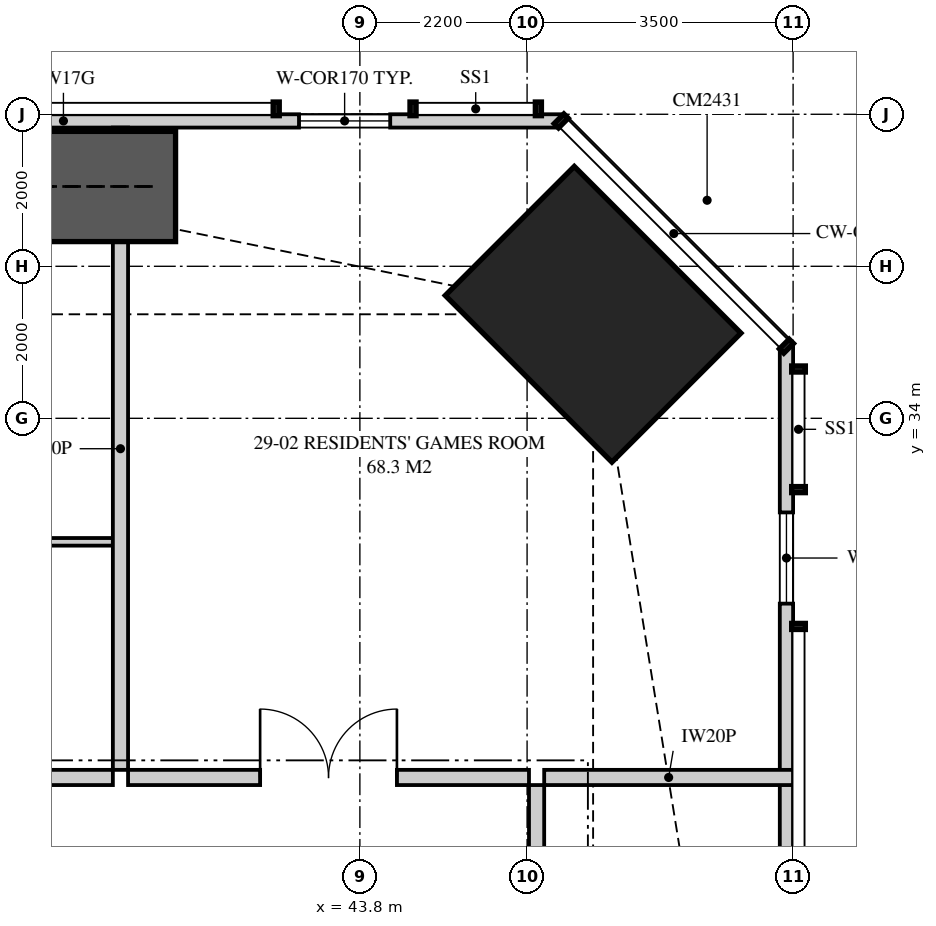
"""IFC4 building model, lengths in metres.
Left out: names, types, materials, properties, quantities, classifications, styles, units other than length and angle.
Written with IfcOpenShell. Run it as: python <this file> out.ifc"""

import sys

from ifc_helpers import new_model, si_unit, direction, frame, frame_2d, origin, origin_2d, place, context, subcontext, project, spatial, polyline, rectangle, outline, extrude, element, fill, save


model = new_model("IFC4")
c1 = context("Model", 3, precision=1e-05, world=origin(), true_north=direction((0.0, 1.0)))
c2 = subcontext(c1, "Body", "Model", "MODEL_VIEW")
j1 = project(units=[si_unit("LENGTHUNIT", "METRE"), si_unit("PLANEANGLEUNIT", "RADIAN")], contexts=[c1])
p1 = place(None, origin())
s1 = spatial("IfcSite", under=j1, at=p1, CompositionType="ELEMENT")
p2 = place(p1, origin())
s2 = spatial("IfcBuilding", under=s1, at=p2, CompositionType="ELEMENT")
p3 = place(p2, frame((0.0, 0.0, 108.2)))
s3 = spatial("IfcBuildingStorey", under=s2, at=p3, CompositionType="ELEMENT", Elevation=108.2)
p4 = place(p3, frame((46.869, 35.369, 0.0), z_axis=(0.0, 0.0, 1.0), x_axis=(-0.707106781187, -0.707106781187, 0.0)))
e1 = element("IfcColumn", 1, at=p4, inside=s3, PredefinedType="COLUMN", context=c2, shape_type="SweptSolid", body=[
    extrude(rectangle(XDim=2.4, YDim=3.1, at=origin_2d()), origin(), (0.0, 0.0, 1.0), 3.35),
])
p5 = place(p3, frame((49.413, 3.051, 0.0), z_axis=(0.0, 0.0, 1.0), x_axis=(0.0, 1.0, 0.0)))
e2 = element("IfcWall", 2, at=p5, inside=s3, PredefinedType="SOLIDWALL", context=c2, shape_type="SweptSolid", body=[
    extrude(outline(polyline([(0.0, 0.0), (31.897, 0.0), (31.897, 3.11), (22.167, 3.11), (22.167, 2.15), (22.074, 2.15), (22.074, 3.11), (21.949, 3.11), (21.949, 2.15), (9.949, 2.15), (9.949, 3.11), (9.823, 3.11), (9.823, 2.15), (9.73, 2.15), (9.73, 3.11), (0.0, 3.11), (0.0, 0.0)])), frame((0.0, 0.087, 0.0), z_axis=(0.0, -1.0, 0.0), x_axis=(1.0, 0.0, 0.0)), (0.0, 0.0, 1.0), 0.175),
])
p6 = place(p5, frame((2.224, 0.0, 0.4)))
e3 = element("IfcOpeningElement", 3, at=p6, cuts=e2, PredefinedType="OPENING", context=c2, shape_type="SweptSolid", body=[
    extrude(rectangle(XDim=1.8, YDim=1.7, at=frame_2d((0.9, 0.85))), frame((0.0, 0.097, 0.0), z_axis=(0.0, -1.0, 0.0), x_axis=(1.0, 0.0, 0.0)), (0.0, 0.0, 1.0), 0.195),
])
p7 = place(p5, frame((14.849, 0.0, 0.4)))
e4 = element("IfcOpeningElement", 4, at=p7, cuts=e2, PredefinedType="OPENING", context=c2, shape_type="SweptSolid", body=[
    extrude(rectangle(XDim=1.2, YDim=1.7, at=frame_2d((0.6, 0.85))), frame((0.0, 0.097, 0.0), z_axis=(0.0, -1.0, 0.0), x_axis=(1.0, 0.0, 0.0)), (0.0, 0.0, 1.0), 0.195),
])
p8 = place(p5, frame((28.51, 0.0, 0.4)))
e5 = element("IfcOpeningElement", 5, at=p8, cuts=e2, PredefinedType="OPENING", context=c2, shape_type="SweptSolid", body=[
    extrude(rectangle(XDim=1.2, YDim=1.7, at=frame_2d((0.6, 0.85))), frame((0.0, 0.097, 0.0), z_axis=(0.0, -1.0, 0.0), x_axis=(1.0, 0.0, 0.0)), (0.0, 0.0, 1.0), 0.195),
])
p9 = place(p3, frame((46.449, 37.913, 0.0), z_axis=(0.0, 0.0, 1.0), x_axis=(-1.0, 0.0, 0.0)))
e6 = element("IfcWall", 6, at=p9, inside=s3, PredefinedType="SOLIDWALL", context=c2, shape_type="SweptSolid", body=[
    extrude(outline(polyline([(0.0, 0.0), (13.098, 0.0), (13.098, 2.15), (7.824, 2.15), (7.824, 3.11), (7.666, 3.11), (7.666, 2.15), (7.62, 2.15), (7.62, 3.11), (0.0, 3.11), (0.0, 0.0)])), frame((0.0, 0.087, 0.0), z_axis=(0.0, -1.0, 0.0), x_axis=(1.0, 0.0, 0.0)), (0.0, 0.0, 1.0), 0.175),
])
p10 = place(p9, frame((2.25, 0.0, 0.4)))
e7 = element("IfcOpeningElement", 7, at=p10, cuts=e6, PredefinedType="OPENING", context=c2, shape_type="SweptSolid", body=[
    extrude(rectangle(XDim=1.2, YDim=1.7, at=frame_2d((0.6, 0.85))), frame((0.0, 0.097, 0.0), z_axis=(0.0, -1.0, 0.0), x_axis=(1.0, 0.0, 0.0)), (0.0, 0.0, 1.0), 0.195),
])
p11 = place(p9, frame((10.798, 0.0, 0.4)))
e8 = element("IfcOpeningElement", 8, at=p11, cuts=e6, PredefinedType="OPENING", context=c2, shape_type="SweptSolid", body=[
    extrude(rectangle(XDim=1.2, YDim=1.7, at=frame_2d((0.6, 0.85))), frame((0.0, 0.097, 0.0), z_axis=(0.0, -1.0, 0.0), x_axis=(1.0, 0.0, 0.0)), (0.0, 0.0, 1.0), 0.195),
])
p12 = place(p3, frame((40.65, 37.825, 0.0), z_axis=(0.0, 0.0, 1.0), x_axis=(0.0, -1.0, 0.0)))
e9 = element("IfcWall", 9, at=p12, inside=s3, PredefinedType="PARTITIONING", context=c2, shape_type="SweptSolid", body=[
    extrude(outline(polyline([(0.259, 3.11), (0.0, 3.11), (0.0, 0.0), (0.529, 0.0), (0.529, 0.12), (1.021, 0.12), (1.021, 0.0), (8.45, 0.0), (8.45, 3.11), (3.766, 3.11), (3.766, 2.51), (2.117, 2.51), (2.117, 2.15), (1.021, 2.15), (1.021, 2.03), (0.529, 2.03), (0.529, 2.15), (0.259, 2.15), (0.259, 3.11)])), frame((0.0, 0.1, 0.0), z_axis=(0.0, -1.0, 0.0), x_axis=(1.0, 0.0, 0.0)), (0.0, 0.0, 1.0), 0.2),
])
p13 = place(p3, frame((37.0, 32.375, 0.0), z_axis=(0.0, 0.0, 1.0), x_axis=(1.0, 0.0, 0.0)))
e10 = element("IfcWall", 10, at=p13, inside=s3, PredefinedType="PARTITIONING", context=c2, shape_type="SweptSolid", body=[
    extrude(outline(polyline([(0.0, 0.0), (3.55, 0.0), (3.55, 3.11), (1.912, 3.11), (1.912, 2.541), (1.338, 2.541), (1.338, 3.11), (0.0, 3.11), (0.0, 0.0)])), frame((0.0, 0.05, 0.0), z_axis=(0.0, -1.0, 0.0), x_axis=(1.0, 0.0, 0.0)), (0.0, 0.0, 1.0), 0.1),
])
p14 = place(p13, frame((1.3, 0.0, 0.0)))
e11 = element("IfcOpeningElement", 11, at=p14, cuts=e10, PredefinedType="OPENING", context=c2, shape_type="SweptSolid", body=[
    extrude(rectangle(XDim=0.9, YDim=2.1, at=frame_2d((0.45, 1.05))), frame((0.0, 0.06, 0.0), z_axis=(0.0, -1.0, 0.0), x_axis=(1.0, 0.0, 0.0)), (0.0, 0.0, 1.0), 0.12),
])
p15 = place(p3, frame((40.75, 29.275, 0.0), z_axis=(0.0, 0.0, 1.0), x_axis=(1.0, 0.0, 0.0)))
e12 = element("IfcWall", 12, at=p15, inside=s3, PredefinedType="PARTITIONING", context=c2, shape_type="SweptSolid", body=[
    extrude(rectangle(XDim=5.275, YDim=0.2, at=frame_2d((2.637, 0.0))), origin(), (0.0, 0.0, 1.0), 3.11),
])
p16 = place(p15, frame((1.738, 0.0, 0.0)))
e13 = element("IfcOpeningElement", 13, at=p16, cuts=e12, PredefinedType="OPENING", context=c2, shape_type="SweptSolid", body=[
    extrude(rectangle(XDim=1.8, YDim=2.1, at=frame_2d((0.9, 1.05))), frame((0.0, 0.11, 0.0), z_axis=(0.0, -1.0, 0.0), x_axis=(1.0, 0.0, 0.0)), (0.0, 0.0, 1.0), 0.22),
])
p17 = place(p3, frame((46.225, 29.275, 0.0), z_axis=(0.0, 0.0, 1.0), x_axis=(1.0, 0.0, 0.0)))
e14 = element("IfcWall", 14, at=p17, inside=s3, PredefinedType="PARTITIONING", context=c2, shape_type="SweptSolid", body=[
    extrude(outline(polyline([(0.0, 0.0), (3.275, 0.0), (3.275, 3.11), (2.554, 3.11), (2.554, 2.15), (0.805, 2.15), (0.805, 2.541), (0.306, 2.541), (0.306, 3.11), (0.0, 3.11), (0.0, 0.0)])), frame((0.0, 0.1, 0.0), z_axis=(0.0, -1.0, 0.0), x_axis=(1.0, 0.0, 0.0)), (0.0, 0.0, 1.0), 0.2),
])
p18 = place(p3, frame((46.125, 7.825, 0.0), z_axis=(0.0, 0.0, 1.0), x_axis=(0.0, 1.0, 0.0)))
e15 = element("IfcWall", 15, at=p18, inside=s3, PredefinedType="PARTITIONING", context=c2, shape_type="SweptSolid", body=[
    extrude(outline(polyline([(0.0, 0.0), (21.35, 0.0), (21.35, 3.11), (17.512, 3.11), (17.512, 2.541), (16.838, 2.541), (16.838, 3.11), (5.512, 3.11), (5.512, 2.541), (4.838, 2.541), (4.838, 3.11), (0.0, 3.11), (0.0, 0.0)])), frame((0.0, 0.1, 0.0), z_axis=(0.0, -1.0, 0.0), x_axis=(1.0, 0.0, 0.0)), (0.0, 0.0, 1.0), 0.2),
])
p19 = place(p18, frame((9.775, 0.0, 0.0)))
e16 = element("IfcOpeningElement", 16, at=p19, cuts=e15, PredefinedType="OPENING", context=c2, shape_type="SweptSolid", body=[
    extrude(rectangle(XDim=1.8, YDim=2.1, at=frame_2d((0.9, 1.05))), frame((0.0, 0.11, 0.0), z_axis=(0.0, -1.0, 0.0), x_axis=(1.0, 0.0, 0.0)), (0.0, 0.0, 1.0), 0.22),
])
p20 = place(p18, frame((19.5, 0.0, 0.0)))
e17 = element("IfcOpeningElement", 17, at=p20, cuts=e15, PredefinedType="OPENING", context=c2, shape_type="SweptSolid", body=[
    extrude(rectangle(XDim=1.0, YDim=2.1, at=frame_2d((0.5, 1.05))), frame((0.0, 0.11, 0.0), z_axis=(0.0, -1.0, 0.0), x_axis=(1.0, 0.0, 0.0)), (0.0, 0.0, 1.0), 0.22),
])
p21 = place(p3, frame((31.363, 29.275, 0.0), z_axis=(0.0, 0.0, 1.0), x_axis=(1.0, 0.0, 0.0)))
e18 = element("IfcWall", 18, at=p21, inside=s3, PredefinedType="PARTITIONING", context=c2, shape_type="SweptSolid", body=[
    extrude(outline(polyline([(0.0, 0.0), (9.188, 0.0), (9.188, 3.11), (7.6, 3.11), (7.6, 2.541), (6.925, 2.541), (6.925, 3.11), (0.0, 3.11), (0.0, 0.0)])), frame((0.0, 0.1, 0.0), z_axis=(0.0, -1.0, 0.0), x_axis=(1.0, 0.0, 0.0)), (0.0, 0.0, 1.0), 0.2),
])
p22 = place(p3, frame((35.875, 37.05, 0.0), z_axis=(0.0, 0.0, 1.0), x_axis=(1.0, 0.0, 0.0)))
e19 = element("IfcWall", 19, at=p22, inside=s3, PredefinedType="SHEAR", context=c2, shape_type="SweptSolid", body=[
    extrude(rectangle(XDim=5.5, YDim=1.45, at=frame_2d((2.75, 0.0))), origin(), (0.0, 0.0, 1.0), 3.35),
])
p23 = place(p8, origin())
e20 = element("IfcWindow", 20, at=p23, inside=s3, PartitioningType="SINGLE_PANEL", PredefinedType="WINDOW", context=c2, shape_type="SweptSolid", body=[
    extrude(rectangle(XDim=1.2, YDim=1.7, at=frame_2d((0.6, 0.85))), frame((0.0, 0.03, 0.0), z_axis=(0.0, -1.0, 0.0), x_axis=(1.0, 0.0, 0.0)), (0.0, 0.0, 1.0), 0.06),
])
fill(e5, e20)
p24 = place(p10, origin())
e21 = element("IfcWindow", 21, at=p24, inside=s3, PartitioningType="SINGLE_PANEL", PredefinedType="WINDOW", context=c2, shape_type="SweptSolid", body=[
    extrude(rectangle(XDim=1.2, YDim=1.7, at=frame_2d((0.6, 0.85))), frame((0.0, 0.03, 0.0), z_axis=(0.0, -1.0, 0.0), x_axis=(1.0, 0.0, 0.0)), (0.0, 0.0, 1.0), 0.06),
])
fill(e7, e21)
p25 = place(p16, origin())
e22 = element("IfcDoor", 22, at=p25, inside=s3, OperationType="DOUBLE_DOOR_SINGLE_SWING", PredefinedType="DOOR", context=c2, shape_type="SweptSolid", body=[
    extrude(rectangle(XDim=1.8, YDim=2.1, at=frame_2d((0.9, 1.05))), frame((0.0, 0.025, 0.0), z_axis=(0.0, -1.0, 0.0), x_axis=(1.0, 0.0, 0.0)), (0.0, 0.0, 1.0), 0.05),
])
fill(e13, e22)
save(model, sys.argv[1])
